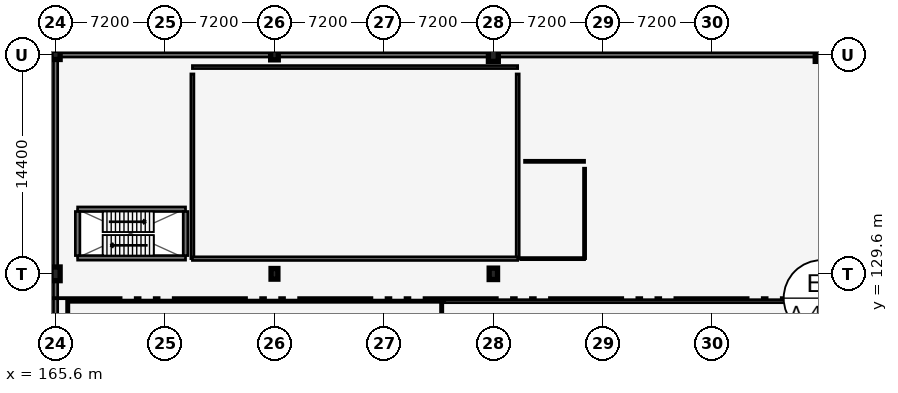
"""IFC4 building model, lengths in metres.
Left out: names, types, materials, properties, quantities, classifications, styles, units other than length and angle.
Written with IfcOpenShell. Run it as: python <this file> out.ifc"""

import sys

from ifc_helpers import new_model, si_unit, direction, frame, frame_2d, origin, origin_2d, place, context, subcontext, project, spatial, rectangle, circle, extrude, element, fill, save


model = new_model("IFC4")
c1 = context("Model", 3, precision=1e-05, world=origin(), true_north=direction((0.0, 1.0)))
c2 = subcontext(c1, "Body", "Model", "MODEL_VIEW")
j1 = project(units=[si_unit("LENGTHUNIT", "METRE"), si_unit("PLANEANGLEUNIT", "RADIAN")], contexts=[c1])
p1 = place(None, origin())
s1 = spatial("IfcSite", under=j1, at=p1, CompositionType="ELEMENT")
p2 = place(p1, origin())
s2 = spatial("IfcBuilding", under=s1, at=p2, CompositionType="ELEMENT")
p3 = place(p2, frame((0.0, 0.0, 4.8)))
s3 = spatial("IfcBuildingStorey", under=s2, at=p3, CompositionType="ELEMENT", Elevation=4.8)
p4 = place(p3, frame((165.6, 129.6, 0.0), z_axis=(0.0, 0.0, 1.0), x_axis=(1.0, 0.0, 0.0)))
e1 = element("IfcColumn", 1, at=p4, inside=s3, PredefinedType="COLUMN", context=c2, shape_type="SweptSolid", body=[
    extrude(rectangle(XDim=0.6, YDim=0.9, at=origin_2d()), origin(), (0.0, 0.0, 1.0), 4.2),
])
p5 = place(p3, frame((165.6, 144.0, 0.0), z_axis=(0.0, 0.0, 1.0), x_axis=(1.0, 0.0, 0.0)))
e2 = element("IfcColumn", 2, at=p5, inside=s3, PredefinedType="COLUMN", context=c2, shape_type="SweptSolid", body=[
    extrude(circle(Radius=0.3, at=origin_2d()), origin(), (0.0, 0.0, 1.0), 4.2),
])
p6 = place(p3, frame((180.0, 129.6, 0.0), z_axis=(0.0, 0.0, 1.0), x_axis=(1.0, 0.0, 0.0)))
e3 = element("IfcColumn", 3, at=p6, inside=s3, PredefinedType="COLUMN", context=c2, shape_type="SweptSolid", body=[
    extrude(rectangle(XDim=0.45, YDim=0.7, at=origin_2d()), origin(), (0.0, 0.0, 1.0), 4.2),
])
p7 = place(p3, frame((180.0, 144.0, 0.0), z_axis=(0.0, 0.0, 1.0), x_axis=(1.0, 0.0, 0.0)))
e4 = element("IfcColumn", 4, at=p7, inside=s3, PredefinedType="COLUMN", context=c2, shape_type="SweptSolid", body=[
    extrude(rectangle(XDim=0.5, YDim=0.65, at=origin_2d()), origin(), (0.0, 0.0, 1.0), 4.2),
])
p8 = place(p3, frame((194.4, 129.6, 0.0), z_axis=(0.0, 0.0, 1.0), x_axis=(1.0, 0.0, 0.0)))
e5 = element("IfcColumn", 5, at=p8, inside=s3, PredefinedType="COLUMN", context=c2, shape_type="SweptSolid", body=[
    extrude(rectangle(XDim=0.55, YDim=0.75, at=origin_2d()), origin(), (0.0, 0.0, 1.0), 4.2),
])
p9 = place(p3, frame((194.4, 144.0, 0.0), z_axis=(0.0, 0.0, 1.0), x_axis=(1.0, 0.0, 0.0)))
e6 = element("IfcColumn", 6, at=p9, inside=s3, PredefinedType="COLUMN", context=c2, shape_type="SweptSolid", body=[
    extrude(rectangle(XDim=0.65, YDim=0.85, at=origin_2d()), origin(), (0.0, 0.0, 1.0), 4.2),
])
p10 = place(p3, frame((216.0, 129.6, 0.0), z_axis=(0.0, 0.0, 1.0), x_axis=(1.0, 0.0, 0.0)))
e7 = element("IfcColumn", 7, at=p10, inside=s3, PredefinedType="COLUMN", context=c2, shape_type="SweptSolid", body=[
    extrude(rectangle(XDim=0.75, YDim=0.95, at=origin_2d()), origin(), (0.0, 0.0, 1.0), 4.2),
])
p11 = place(p3, frame((216.0, 144.0, 0.0), z_axis=(0.0, 0.0, 1.0), x_axis=(1.0, 0.0, 0.0)))
e8 = element("IfcColumn", 8, at=p11, inside=s3, PredefinedType="COLUMN", context=c2, shape_type="SweptSolid", body=[
    extrude(rectangle(XDim=0.85, YDim=0.85, at=origin_2d()), origin(), (0.0, 0.0, 1.0), 4.2),
])
p12 = place(p3, frame((216.0, 144.0, 0.0), z_axis=(0.0, 0.0, 1.0), x_axis=(-1.0, 0.0, 0.0)))
e9 = element("IfcWall", 9, at=p12, inside=s3, PredefinedType="SOLIDWALL", context=c2, shape_type="SweptSolid", body=[
    extrude(rectangle(XDim=50.4, YDim=0.28, at=frame_2d((25.2, 0.0))), origin(), (0.0, 0.0, 1.0), 3.5),
])
p13 = place(p12, frame((2.2, 0.0, 0.78)))
e10 = element("IfcOpeningElement", 10, at=p13, cuts=e9, PredefinedType="OPENING", context=c2, shape_type="SweptSolid", body=[
    extrude(rectangle(XDim=1.35, YDim=1.75, at=frame_2d((0.675, 0.875))), frame((0.0, 0.15, 0.0), z_axis=(0.0, -1.0, 0.0), x_axis=(1.0, 0.0, 0.0)), (0.0, 0.0, 1.0), 0.3),
])
p14 = place(p12, frame((9.4, 0.0, 0.78)))
e11 = element("IfcOpeningElement", 11, at=p14, cuts=e9, PredefinedType="OPENING", context=c2, shape_type="SweptSolid", body=[
    extrude(rectangle(XDim=1.5, YDim=1.75, at=frame_2d((0.75, 0.875))), frame((0.0, 0.15, 0.0), z_axis=(0.0, -1.0, 0.0), x_axis=(1.0, 0.0, 0.0)), (0.0, 0.0, 1.0), 0.3),
])
p15 = place(p12, frame((16.6, 0.0, 0.78)))
e12 = element("IfcOpeningElement", 12, at=p15, cuts=e9, PredefinedType="OPENING", context=c2, shape_type="SweptSolid", body=[
    extrude(rectangle(XDim=1.65, YDim=1.8, at=frame_2d((0.825, 0.9))), frame((0.0, 0.15, 0.0), z_axis=(0.0, -1.0, 0.0), x_axis=(1.0, 0.0, 0.0)), (0.0, 0.0, 1.0), 0.3),
])
p16 = place(p12, frame((23.8, 0.0, 0.78)))
e13 = element("IfcOpeningElement", 13, at=p16, cuts=e9, PredefinedType="OPENING", context=c2, shape_type="SweptSolid", body=[
    extrude(rectangle(XDim=1.95, YDim=1.8, at=frame_2d((0.975, 0.9))), frame((0.0, 0.15, 0.0), z_axis=(0.0, -1.0, 0.0), x_axis=(1.0, 0.0, 0.0)), (0.0, 0.0, 1.0), 0.3),
])
p17 = place(p12, frame((31.0, 0.0, 0.78)))
e14 = element("IfcOpeningElement", 14, at=p17, cuts=e9, PredefinedType="OPENING", context=c2, shape_type="SweptSolid", body=[
    extrude(rectangle(XDim=2.1, YDim=1.8, at=frame_2d((1.05, 0.9))), frame((0.0, 0.15, 0.0), z_axis=(0.0, -1.0, 0.0), x_axis=(1.0, 0.0, 0.0)), (0.0, 0.0, 1.0), 0.3),
])
p18 = place(p12, frame((38.2, 0.0, 0.78)))
e15 = element("IfcOpeningElement", 15, at=p18, cuts=e9, PredefinedType="OPENING", context=c2, shape_type="SweptSolid", body=[
    extrude(rectangle(XDim=1.1, YDim=1.65, at=frame_2d((0.55, 0.825))), frame((0.0, 0.15, 0.0), z_axis=(0.0, -1.0, 0.0), x_axis=(1.0, 0.0, 0.0)), (0.0, 0.0, 1.0), 0.3),
])
p19 = place(p3, frame((165.6, 144.0, 0.0), z_axis=(0.0, 0.0, 1.0), x_axis=(0.0, -1.0, 0.0)))
e16 = element("IfcWall", 16, at=p19, inside=s3, PredefinedType="SOLIDWALL", context=c2, shape_type="SweptSolid", body=[
    extrude(rectangle(XDim=28.8, YDim=0.28, at=frame_2d((14.4, 0.0))), origin(), (0.0, 0.0, 1.0), 3.5),
])
p20 = place(p19, frame((2.2, 0.0, 0.78)))
e17 = element("IfcOpeningElement", 17, at=p20, cuts=e16, PredefinedType="OPENING", context=c2, shape_type="SweptSolid", body=[
    extrude(rectangle(XDim=1.5, YDim=1.75, at=frame_2d((0.75, 0.875))), frame((0.0, 0.15, 0.0), z_axis=(0.0, -1.0, 0.0), x_axis=(1.0, 0.0, 0.0)), (0.0, 0.0, 1.0), 0.3),
])
p21 = place(p19, frame((9.4, 0.0, 0.78)))
e18 = element("IfcOpeningElement", 18, at=p21, cuts=e16, PredefinedType="OPENING", context=c2, shape_type="SweptSolid", body=[
    extrude(rectangle(XDim=1.65, YDim=1.8, at=frame_2d((0.825, 0.9))), frame((0.0, 0.15, 0.0), z_axis=(0.0, -1.0, 0.0), x_axis=(1.0, 0.0, 0.0)), (0.0, 0.0, 1.0), 0.3),
])
p22 = place(p19, frame((16.6, 0.0, 0.78)))
e19 = element("IfcOpeningElement", 19, at=p22, cuts=e16, PredefinedType="OPENING", context=c2, shape_type="SweptSolid", body=[
    extrude(rectangle(XDim=1.95, YDim=1.8, at=frame_2d((0.975, 0.9))), frame((0.0, 0.15, 0.0), z_axis=(0.0, -1.0, 0.0), x_axis=(1.0, 0.0, 0.0)), (0.0, 0.0, 1.0), 0.3),
])
p23 = place(p3, frame((167.05, 130.65, 0.0), z_axis=(0.0, 0.0, 1.0), x_axis=(1.0, 0.0, 0.0)))
e20 = element("IfcWall", 20, at=p23, inside=s3, PredefinedType="SHEAR", context=c2, shape_type="SweptSolid", body=[
    extrude(rectangle(XDim=7.1, YDim=0.3, at=frame_2d((3.55, 0.0))), origin(), (0.0, 0.0, 1.0), 3.45),
])
p24 = place(p23, frame((0.35, 0.0, 0.0)))
e21 = element("IfcOpeningElement", 21, at=p24, cuts=e20, PredefinedType="OPENING", context=c2, shape_type="SweptSolid", body=[
    extrude(rectangle(XDim=1.07, YDim=2.15, at=frame_2d((0.535, 1.075))), frame((0.0, 0.16, 0.0), z_axis=(0.0, -1.0, 0.0), x_axis=(1.0, 0.0, 0.0)), (0.0, 0.0, 1.0), 0.32),
])
p25 = place(p3, frame((174.15, 133.85, 0.0), z_axis=(0.0, 0.0, 1.0), x_axis=(-1.0, 0.0, 0.0)))
e22 = element("IfcWall", 22, at=p25, inside=s3, PredefinedType="SHEAR", context=c2, shape_type="SweptSolid", body=[
    extrude(rectangle(XDim=7.1, YDim=0.3, at=frame_2d((3.55, 0.0))), origin(), (0.0, 0.0, 1.0), 3.45),
])
for number, where, z_axis, x_axis in (
    (23, (174.15, 130.8, 0.0), (0.0, 0.0, 1.0), (0.0, 1.0, 0.0)),
    (24, (167.05, 133.7, 0.0), (0.0, 0.0, 1.0), (0.0, -1.0, 0.0)),
):
    element("IfcWall", number, at=place(p3, frame(where, z_axis=z_axis, x_axis=x_axis)), inside=s3, PredefinedType="SHEAR", context=c2, shape_type="SweptSolid", body=[
        extrude(rectangle(XDim=2.9, YDim=0.3, at=frame_2d((1.45, 0.0))), origin(), (0.0, 0.0, 1.0), 3.45),
    ])
for number, where, z_axis, x_axis in (
    (25, (191.0, 116.45, 0.0), (0.0, 0.0, 1.0), (0.0, 1.0, 0.0)),
    (26, (166.4, 127.8, 0.0), (0.0, 0.0, 1.0), (0.0, -1.0, 0.0)),
):
    element("IfcWall", number, at=place(p3, frame(where, z_axis=z_axis, x_axis=x_axis)), inside=s3, PredefinedType="PARTITIONING", context=c2, shape_type="SweptSolid", body=[
        extrude(rectangle(XDim=11.35, YDim=0.15, at=frame_2d((5.675, 0.0))), origin(), (0.0, 0.0, 1.0), 3.6),
    ])
p26 = place(p3, frame((166.4, 127.8, 0.0), z_axis=(0.0, 0.0, 1.0), x_axis=(1.0, 0.0, 0.0)))
e27 = element("IfcWall", 27, at=p26, inside=s3, PredefinedType="PARTITIONING", context=c2, shape_type="SweptSolid", body=[
    extrude(rectangle(XDim=24.6, YDim=0.15, at=frame_2d((12.3, 0.0))), origin(), (0.0, 0.0, 1.0), 3.253),
])
p27 = place(p26, frame((11.82, 0.0, 0.0)))
e28 = element("IfcOpeningElement", 28, at=p27, cuts=e27, PredefinedType="OPENING", context=c2, shape_type="SweptSolid", body=[
    extrude(rectangle(XDim=0.96, YDim=2.15, at=frame_2d((0.48, 1.075))), frame((0.0, 0.085, 0.0), z_axis=(0.0, -1.0, 0.0), x_axis=(1.0, 0.0, 0.0)), (0.0, 0.0, 1.0), 0.17),
])
p28 = place(p3, frame((215.0, 116.45, 0.0), z_axis=(0.0, 0.0, 1.0), x_axis=(0.0, 1.0, 0.0)))
e29 = element("IfcWall", 29, at=p28, inside=s3, PredefinedType="SOLIDWALL", context=c2, shape_type="SweptSolid", body=[
    extrude(rectangle(XDim=11.35, YDim=0.2, at=frame_2d((5.675, 0.0))), origin(), (0.0, 0.0, 1.0), 3.6),
])
p29 = place(p3, frame((191.2, 127.8, 0.0), z_axis=(0.0, 0.0, 1.0), x_axis=(1.0, 0.0, 0.0)))
e30 = element("IfcWall", 30, at=p29, inside=s3, PredefinedType="SOLIDWALL", context=c2, shape_type="SweptSolid", body=[
    extrude(rectangle(XDim=23.8, YDim=0.2, at=frame_2d((11.9, 0.0))), origin(), (0.0, 0.0, 1.0), 3.174),
])
p30 = place(p29, frame((11.0, 0.0, 0.0)))
e31 = element("IfcOpeningElement", 31, at=p30, cuts=e30, PredefinedType="OPENING", context=c2, shape_type="SweptSolid", body=[
    extrude(rectangle(XDim=1.8, YDim=2.2, at=frame_2d((0.9, 1.1))), frame((0.0, 0.11, 0.0), z_axis=(0.0, -1.0, 0.0), x_axis=(1.0, 0.0, 0.0)), (0.0, 0.0, 1.0), 0.22),
])
p31 = place(p3, frame((174.6, 143.2, 0.0), z_axis=(0.0, 0.0, 1.0), x_axis=(1.0, 0.0, 0.0)))
e32 = element("IfcWall", 32, at=p31, inside=s3, PredefinedType="SOLIDWALL", context=c2, shape_type="SweptSolid", body=[
    extrude(rectangle(XDim=21.4, YDim=0.2, at=frame_2d((10.7, 0.0))), origin(), (0.0, 0.0, 1.0), 3.174),
])
for number, where, z_axis, x_axis in (
    (33, (196.0, 130.6, 0.0), (0.0, 0.0, 1.0), (0.0, 1.0, 0.0)),
    (34, (174.6, 142.75, 0.0), (0.0, 0.0, 1.0), (0.0, -1.0, 0.0)),
):
    element("IfcWall", number, at=place(p3, frame(where, z_axis=z_axis, x_axis=x_axis)), inside=s3, PredefinedType="SOLIDWALL", context=c2, shape_type="SweptSolid", body=[
        extrude(rectangle(XDim=12.15, YDim=0.2, at=frame_2d((6.075, 0.0))), origin(), (0.0, 0.0, 1.0), 3.6),
    ])
p32 = place(p3, frame((196.0, 130.6, 0.0), z_axis=(0.0, 0.0, 1.0), x_axis=(-1.0, 0.0, 0.0)))
e35 = element("IfcWall", 35, at=p32, inside=s3, PredefinedType="SOLIDWALL", context=c2, shape_type="SweptSolid", body=[
    extrude(rectangle(XDim=21.4, YDim=0.24, at=frame_2d((10.7, 0.0))), origin(), (0.0, 0.0, 1.0), 3.174),
])
p33 = place(p32, frame((9.9, 0.0, 0.0)))
e36 = element("IfcOpeningElement", 36, at=p33, cuts=e35, PredefinedType="OPENING", context=c2, shape_type="SweptSolid", body=[
    extrude(rectangle(XDim=1.6, YDim=2.15, at=frame_2d((0.8, 1.075))), frame((0.0, 0.13, 0.0), z_axis=(0.0, -1.0, 0.0), x_axis=(1.0, 0.0, 0.0)), (0.0, 0.0, 1.0), 0.26),
])
p34 = place(p3, frame((196.45, 137.0, 0.0), z_axis=(0.0, 0.0, 1.0), x_axis=(1.0, 0.0, 0.0)))
e37 = element("IfcWall", 37, at=p34, inside=s3, PredefinedType="PARTITIONING", context=c2, shape_type="SweptSolid", body=[
    extrude(rectangle(XDim=3.95, YDim=0.14, at=frame_2d((1.975, 0.0))), origin(), (0.0, 0.0, 1.0), 3.5),
])
p35 = place(p3, frame((200.4, 130.6, 0.0), z_axis=(0.0, 0.0, 1.0), x_axis=(0.0, 1.0, 0.0)))
e38 = element("IfcWall", 38, at=p35, inside=s3, PredefinedType="PARTITIONING", context=c2, shape_type="SweptSolid", body=[
    extrude(rectangle(XDim=5.95, YDim=0.14, at=frame_2d((2.975, 0.0))), origin(), (0.0, 0.0, 1.0), 3.5),
])
p36 = place(p3, frame((200.4, 130.6, 0.0), z_axis=(0.0, 0.0, 1.0), x_axis=(-1.0, 0.0, 0.0)))
e39 = element("IfcWall", 39, at=p36, inside=s3, PredefinedType="PARTITIONING", context=c2, shape_type="SweptSolid", body=[
    extrude(rectangle(XDim=4.2, YDim=0.14, at=frame_2d((2.1, 0.0))), origin(), (0.0, 0.0, 1.0), 3.5),
])
p37 = place(p36, frame((1.605, 0.0, 0.0)))
e40 = element("IfcOpeningElement", 40, at=p37, cuts=e39, PredefinedType="OPENING", context=c2, shape_type="SweptSolid", body=[
    extrude(rectangle(XDim=0.99, YDim=2.15, at=frame_2d((0.495, 1.075))), frame((0.0, 0.08, 0.0), z_axis=(0.0, -1.0, 0.0), x_axis=(1.0, 0.0, 0.0)), (0.0, 0.0, 1.0), 0.16),
])
p38 = place(p13, origin())
e41 = element("IfcWindow", 41, at=p38, inside=s3, PartitioningType="SINGLE_PANEL", PredefinedType="WINDOW", context=c2, shape_type="SweptSolid", body=[
    extrude(rectangle(XDim=1.35, YDim=1.75, at=frame_2d((0.675, 0.875))), frame((0.0, 0.03, 0.0), z_axis=(0.0, -1.0, 0.0), x_axis=(1.0, 0.0, 0.0)), (0.0, 0.0, 1.0), 0.06),
])
fill(e10, e41)
p39 = place(p14, origin())
e42 = element("IfcWindow", 42, at=p39, inside=s3, PartitioningType="SINGLE_PANEL", PredefinedType="WINDOW", context=c2, shape_type="SweptSolid", body=[
    extrude(rectangle(XDim=1.5, YDim=1.75, at=frame_2d((0.75, 0.875))), frame((0.0, 0.03, 0.0), z_axis=(0.0, -1.0, 0.0), x_axis=(1.0, 0.0, 0.0)), (0.0, 0.0, 1.0), 0.06),
])
fill(e11, e42)
p40 = place(p15, origin())
e43 = element("IfcWindow", 43, at=p40, inside=s3, PartitioningType="SINGLE_PANEL", PredefinedType="WINDOW", context=c2, shape_type="SweptSolid", body=[
    extrude(rectangle(XDim=1.65, YDim=1.8, at=frame_2d((0.825, 0.9))), frame((0.0, 0.03, 0.0), z_axis=(0.0, -1.0, 0.0), x_axis=(1.0, 0.0, 0.0)), (0.0, 0.0, 1.0), 0.06),
])
fill(e12, e43)
p41 = place(p16, origin())
e44 = element("IfcWindow", 44, at=p41, inside=s3, PartitioningType="SINGLE_PANEL", PredefinedType="WINDOW", context=c2, shape_type="SweptSolid", body=[
    extrude(rectangle(XDim=1.95, YDim=1.8, at=frame_2d((0.975, 0.9))), frame((0.0, 0.03, 0.0), z_axis=(0.0, -1.0, 0.0), x_axis=(1.0, 0.0, 0.0)), (0.0, 0.0, 1.0), 0.06),
])
fill(e13, e44)
p42 = place(p17, origin())
e45 = element("IfcWindow", 45, at=p42, inside=s3, PartitioningType="SINGLE_PANEL", PredefinedType="WINDOW", context=c2, shape_type="SweptSolid", body=[
    extrude(rectangle(XDim=2.1, YDim=1.8, at=frame_2d((1.05, 0.9))), frame((0.0, 0.03, 0.0), z_axis=(0.0, -1.0, 0.0), x_axis=(1.0, 0.0, 0.0)), (0.0, 0.0, 1.0), 0.06),
])
fill(e14, e45)
p43 = place(p18, origin())
e46 = element("IfcWindow", 46, at=p43, inside=s3, PartitioningType="SINGLE_PANEL", PredefinedType="WINDOW", context=c2, shape_type="SweptSolid", body=[
    extrude(rectangle(XDim=1.1, YDim=1.65, at=frame_2d((0.55, 0.825))), frame((0.0, 0.03, 0.0), z_axis=(0.0, -1.0, 0.0), x_axis=(1.0, 0.0, 0.0)), (0.0, 0.0, 1.0), 0.06),
])
fill(e15, e46)
p44 = place(p20, origin())
e47 = element("IfcWindow", 47, at=p44, inside=s3, PartitioningType="SINGLE_PANEL", PredefinedType="WINDOW", context=c2, shape_type="SweptSolid", body=[
    extrude(rectangle(XDim=1.5, YDim=1.75, at=frame_2d((0.75, 0.875))), frame((0.0, 0.03, 0.0), z_axis=(0.0, -1.0, 0.0), x_axis=(1.0, 0.0, 0.0)), (0.0, 0.0, 1.0), 0.06),
])
fill(e17, e47)
p45 = place(p21, origin())
e48 = element("IfcWindow", 48, at=p45, inside=s3, PartitioningType="SINGLE_PANEL", PredefinedType="WINDOW", context=c2, shape_type="SweptSolid", body=[
    extrude(rectangle(XDim=1.65, YDim=1.8, at=frame_2d((0.825, 0.9))), frame((0.0, 0.03, 0.0), z_axis=(0.0, -1.0, 0.0), x_axis=(1.0, 0.0, 0.0)), (0.0, 0.0, 1.0), 0.06),
])
fill(e18, e48)
p46 = place(p22, origin())
e49 = element("IfcWindow", 49, at=p46, inside=s3, PartitioningType="SINGLE_PANEL", PredefinedType="WINDOW", context=c2, shape_type="SweptSolid", body=[
    extrude(rectangle(XDim=1.95, YDim=1.8, at=frame_2d((0.975, 0.9))), frame((0.0, 0.03, 0.0), z_axis=(0.0, -1.0, 0.0), x_axis=(1.0, 0.0, 0.0)), (0.0, 0.0, 1.0), 0.06),
])
fill(e19, e49)
p47 = place(p24, origin())
e50 = element("IfcDoor", 50, at=p47, inside=s3, OperationType="SINGLE_SWING_RIGHT", PredefinedType="DOOR", context=c2, shape_type="SweptSolid", body=[
    extrude(rectangle(XDim=1.07, YDim=2.15, at=frame_2d((0.535, 1.075))), frame((0.0, 0.025, 0.0), z_axis=(0.0, -1.0, 0.0), x_axis=(1.0, 0.0, 0.0)), (0.0, 0.0, 1.0), 0.05),
])
fill(e21, e50)
p48 = place(p27, origin())
e51 = element("IfcDoor", 51, at=p48, inside=s3, OperationType="SINGLE_SWING_LEFT", PredefinedType="DOOR", context=c2, shape_type="SweptSolid", body=[
    extrude(rectangle(XDim=0.96, YDim=2.15, at=frame_2d((0.48, 1.075))), frame((0.0, 0.025, 0.0), z_axis=(0.0, -1.0, 0.0), x_axis=(1.0, 0.0, 0.0)), (0.0, 0.0, 1.0), 0.05),
])
fill(e28, e51)
p49 = place(p30, origin())
e52 = element("IfcDoor", 52, at=p49, inside=s3, OperationType="DOUBLE_SWING_LEFT", PredefinedType="DOOR", context=c2, shape_type="SweptSolid", body=[
    extrude(rectangle(XDim=1.8, YDim=2.2, at=frame_2d((0.9, 1.1))), frame((0.0, 0.025, 0.0), z_axis=(0.0, -1.0, 0.0), x_axis=(1.0, 0.0, 0.0)), (0.0, 0.0, 1.0), 0.05),
])
fill(e31, e52)
p50 = place(p33, origin())
e53 = element("IfcDoor", 53, at=p50, inside=s3, OperationType="DOUBLE_SWING_RIGHT", PredefinedType="DOOR", context=c2, shape_type="SweptSolid", body=[
    extrude(rectangle(XDim=1.6, YDim=2.15, at=frame_2d((0.8, 1.075))), frame((0.0, 0.025, 0.0), z_axis=(0.0, -1.0, 0.0), x_axis=(1.0, 0.0, 0.0)), (0.0, 0.0, 1.0), 0.05),
])
fill(e36, e53)
p51 = place(p37, origin())
e54 = element("IfcDoor", 54, at=p51, inside=s3, OperationType="SINGLE_SWING_RIGHT", PredefinedType="DOOR", context=c2, shape_type="SweptSolid", body=[
    extrude(rectangle(XDim=0.99, YDim=2.15, at=frame_2d((0.495, 1.075))), frame((0.0, 0.025, 0.0), z_axis=(0.0, -1.0, 0.0), x_axis=(1.0, 0.0, 0.0)), (0.0, 0.0, 1.0), 0.05),
])
fill(e40, e54)
save(model, sys.argv[1])
